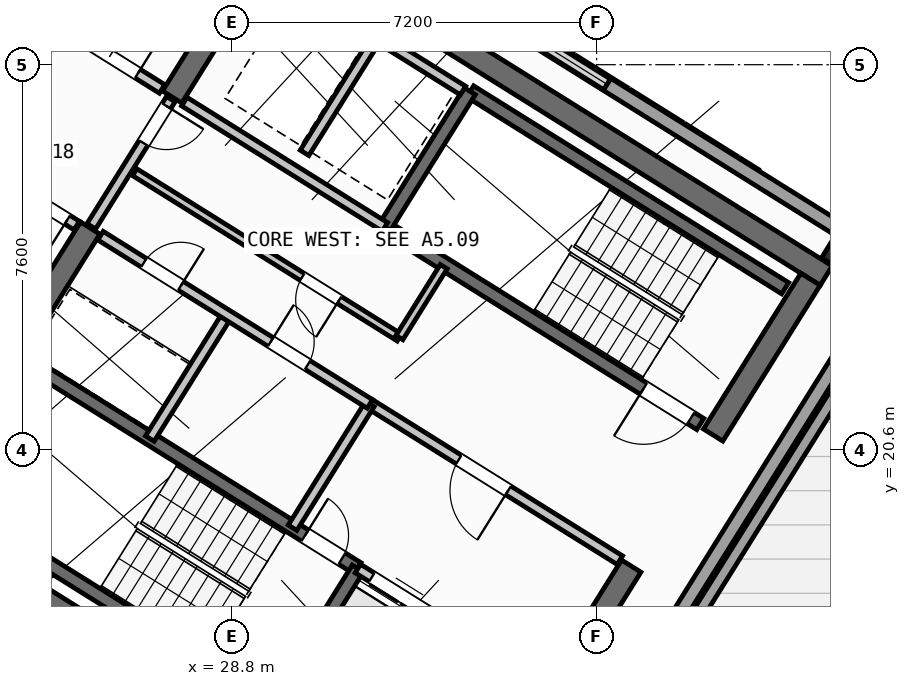
"""IFC4 building model, lengths in metres.
Left out: names, types, materials, properties, quantities, classifications, styles, units other than length and angle.
Written with IfcOpenShell. Run it as: python <this file> out.ifc"""

import sys

from ifc_helpers import new_model, si_unit, direction, frame, frame_2d, origin, origin_2d, place, context, subcontext, project, spatial, rectangle, hollow_rectangle, extrude, source, transform, mapped, element, fill, save


model = new_model("IFC4")
c1 = context("Model", 3, precision=1e-05, world=origin(), true_north=direction((0.0, 1.0)))
c2 = subcontext(c1, "Body", "Model", "MODEL_VIEW")
j1 = project(units=[si_unit("LENGTHUNIT", "METRE"), si_unit("PLANEANGLEUNIT", "RADIAN")], contexts=[c1])
p1 = place(None, origin())
s1 = spatial("IfcSite", under=j1, at=p1, CompositionType="ELEMENT")
p2 = place(p1, origin())
s2 = spatial("IfcBuilding", under=s1, at=p2, CompositionType="ELEMENT")
p3 = place(p2, frame((0.0, 0.0, 298.8)))
s3 = spatial("IfcBuildingStorey", under=s2, at=p3, CompositionType="ELEMENT", Elevation=298.8)
p4 = place(p3, frame((40.531, 24.036, 0.0), z_axis=(0.0, 0.0, 1.0), x_axis=(-0.848048787466, 0.529918157905, 0.0)))
e1 = element("IfcWall", 1, at=p4, inside=s3, PredefinedType="SHEAR", context=c2, shape_type="SweptSolid", body=[
    extrude(rectangle(XDim=13.04, YDim=0.45, at=frame_2d((6.52, 0.0))), origin(), (0.0, 0.0, 1.0), 3.32),
])
p5 = place(p3, frame((33.324, 12.503, 0.0), z_axis=(0.0, 0.0, 1.0), x_axis=(-0.848043529849, 0.529926571782, 0.0)))
e2 = element("IfcWall", 2, at=p5, inside=s3, PredefinedType="SHEAR", context=c2, shape_type="SweptSolid", body=[
    extrude(rectangle(XDim=13.04, YDim=0.45, at=frame_2d((6.52, 0.0))), origin(), (0.0, 0.0, 1.0), 3.32),
])
p6 = place(p3, frame((40.221, 23.965, 0.0), z_axis=(0.0, 0.0, 1.0), x_axis=(-0.529902075036, -0.848058836916, 0.0)))
e3 = element("IfcWall", 3, at=p6, inside=s3, PredefinedType="SHEAR", context=c2, shape_type="SweptSolid", body=[
    extrude(rectangle(XDim=3.625, YDim=0.45, at=frame_2d((1.812, 0.0))), origin(), (0.0, 0.0, 1.0), 3.32),
])
p7 = place(p3, frame((36.683, 18.304, 0.0), z_axis=(0.0, 0.0, 1.0), x_axis=(-0.529904039071, -0.848057609704, 0.0)))
e4 = element("IfcWall", 4, at=p7, inside=s3, PredefinedType="SHEAR", context=c2, shape_type="SweptSolid", body=[
    extrude(rectangle(XDim=6.475, YDim=0.45, at=frame_2d((3.238, 0.0))), origin(), (0.0, 0.0, 1.0), 3.32),
])
p8 = place(p3, frame((29.544, 30.636, 0.0), z_axis=(0.0, 0.0, 1.0), x_axis=(-0.529902075036, -0.848058836916, 0.0)))
e5 = element("IfcWall", 5, at=p8, inside=s3, PredefinedType="SHEAR", context=c2, shape_type="SweptSolid", body=[
    extrude(rectangle(XDim=3.625, YDim=0.45, at=frame_2d((1.812, 0.0))), origin(), (0.0, 0.0, 1.0), 3.32),
])
p9 = place(p3, frame((26.007, 24.976, 0.0), z_axis=(0.0, 0.0, 1.0), x_axis=(-0.529931155655, -0.848040665456, 0.0)))
e6 = element("IfcWall", 6, at=p9, inside=s3, PredefinedType="SHEAR", context=c2, shape_type="SweptSolid", body=[
    extrude(rectangle(XDim=6.475, YDim=0.45, at=frame_2d((3.238, 0.0))), origin(), (0.0, 0.0, 1.0), 3.32),
])
m1 = source(origin(), c2, "Body", "SweptSolid", [
    extrude(hollow_rectangle(XDim=0.5, YDim=0.5, WallThickness=0.025, at=origin_2d()), origin(), (0.0, 0.0, 1.0), 3.6),
])
p10 = place(p3, frame((40.783, 24.469, 0.0), z_axis=(0.0, 0.0, 1.0), x_axis=(-0.848048096156, 0.529919264233, 0.0)))
e7 = element("IfcColumn", 7, at=p10, inside=s3, PredefinedType="COLUMN", context=c2, shape_type="MappedRepresentation", body=[
    mapped(m1, transform((0.0, 0.0, 0.0), scale=1.0)),
])
p11 = place(p3, frame((31.994, 7.742, 0.0), z_axis=(0.0, 0.0, 1.0), x_axis=(0.529920903963, 0.848047071537, 0.0)))
e8 = element("IfcWall", 8, at=p11, inside=s3, PredefinedType="PARAPET", context=c2, shape_type="SweptSolid", body=[
    extrude(rectangle(XDim=17.436, YDim=0.24, at=frame_2d((8.718, 0.0))), origin(), (0.0, 0.0, 1.0), 1.15),
])
p12 = place(p3, frame((41.182, 23.031, 0.0), z_axis=(0.0, 0.0, 1.0), x_axis=(-0.529915150569, -0.848050666645, 0.0)))
e9 = element("IfcWall", 9, at=p12, inside=s3, PredefinedType="STANDARD", context=c2, shape_type="SweptSolid", body=[
    extrude(rectangle(XDim=18.334, YDim=0.28, at=frame_2d((9.167, 0.0))), origin(), (0.0, 0.0, 1.0), 3.32),
])
p13 = place(p12, frame((8.317, 0.0, 0.85)))
e10 = element("IfcOpeningElement", 10, at=p13, cuts=e9, PredefinedType="OPENING", context=c2, shape_type="SweptSolid", body=[
    extrude(rectangle(XDim=1.7, YDim=1.6, at=frame_2d((0.85, 0.8))), frame((0.0, 0.15, 0.0), z_axis=(0.0, -1.0, 0.0), x_axis=(1.0, 0.0, 0.0)), (0.0, 0.0, 1.0), 0.3),
])
p14 = place(p3, frame((29.512, 7.031, 0.0), z_axis=(0.0, 0.0, 1.0), x_axis=(-0.848049620433, 0.529916824873, 0.0)))
e11 = element("IfcWall", 11, at=p14, inside=s3, PredefinedType="STANDARD", context=c2, shape_type="SweptSolid", body=[
    extrude(rectangle(XDim=22.984, YDim=0.28, at=frame_2d((11.492, 0.0))), origin(), (0.0, 0.0, 1.0), 3.32),
])
p15 = place(p14, frame((8.283, 0.0, 0.85)))
e12 = element("IfcOpeningElement", 12, at=p15, cuts=e11, PredefinedType="OPENING", context=c2, shape_type="SweptSolid", body=[
    extrude(rectangle(XDim=1.7, YDim=1.6, at=frame_2d((0.85, 0.8))), frame((0.0, 0.15, 0.0), z_axis=(0.0, -1.0, 0.0), x_axis=(1.0, 0.0, 0.0)), (0.0, 0.0, 1.0), 0.3),
])
p16 = place(p14, frame((19.875, 0.0, 0.85)))
e13 = element("IfcOpeningElement", 13, at=p16, cuts=e11, PredefinedType="OPENING", context=c2, shape_type="SweptSolid", body=[
    extrude(rectangle(XDim=1.7, YDim=1.6, at=frame_2d((0.85, 0.8))), frame((0.0, 0.15, 0.0), z_axis=(0.0, -1.0, 0.0), x_axis=(1.0, 0.0, 0.0)), (0.0, 0.0, 1.0), 0.3),
])
p17 = place(p3, frame((21.239, 37.164, 0.0), z_axis=(0.0, 0.0, 1.0), x_axis=(0.848046637573, -0.529921598447, 0.0)))
e14 = element("IfcWall", 14, at=p17, inside=s3, PredefinedType="STANDARD", context=c2, shape_type="SweptSolid", body=[
    extrude(rectangle(XDim=22.984, YDim=0.28, at=frame_2d((11.492, 0.0))), origin(), (0.0, 0.0, 1.0), 3.32),
])
p18 = place(p17, frame((4.326, 0.0, 0.85)))
e15 = element("IfcOpeningElement", 15, at=p18, cuts=e14, PredefinedType="OPENING", context=c2, shape_type="SweptSolid", body=[
    extrude(rectangle(XDim=1.7, YDim=1.6, at=frame_2d((0.85, 0.8))), frame((0.0, 0.15, 0.0), z_axis=(0.0, -1.0, 0.0), x_axis=(1.0, 0.0, 0.0)), (0.0, 0.0, 1.0), 0.3),
])
p19 = place(p17, frame((15.968, 0.0, 0.85)))
e16 = element("IfcOpeningElement", 16, at=p19, cuts=e14, PredefinedType="OPENING", context=c2, shape_type="SweptSolid", body=[
    extrude(rectangle(XDim=1.7, YDim=1.6, at=frame_2d((0.85, 0.8))), frame((0.0, 0.15, 0.0), z_axis=(0.0, -1.0, 0.0), x_axis=(1.0, 0.0, 0.0)), (0.0, 0.0, 1.0), 0.3),
])
p20 = place(p3, frame((29.605, 15.581, 0.0), z_axis=(0.0, 0.0, 1.0), x_axis=(-0.848036911448, 0.529937163087, 0.0)))
e17 = element("IfcWall", 17, at=p20, inside=s3, PredefinedType="SHEAR", context=c2, shape_type="SweptSolid", body=[
    extrude(rectangle(XDim=7.46, YDim=0.26, at=frame_2d((3.73, 0.0))), origin(), (0.0, 0.0, 1.0), 3.32),
])
p21 = place(p3, frame((31.28, 18.261, 0.0), z_axis=(0.0, 0.0, 1.0), x_axis=(-0.848051618787, 0.529913626805, 0.0)))
e18 = element("IfcWall", 18, at=p21, inside=s3, PredefinedType="SHEAR", context=c2, shape_type="SweptSolid", body=[
    extrude(rectangle(XDim=7.46, YDim=0.26, at=frame_2d((3.73, 0.0))), origin(), (0.0, 0.0, 1.0), 3.32),
])
p22 = place(p21, frame((0.36, 0.0, 0.0)))
e19 = element("IfcOpeningElement", 19, at=p22, cuts=e18, PredefinedType="OPENING", context=c2, shape_type="SweptSolid", body=[
    extrude(rectangle(XDim=0.86, YDim=2.05, at=frame_2d((0.43, 1.025))), frame((0.0, 0.14, 0.0), z_axis=(0.0, -1.0, 0.0), x_axis=(1.0, 0.0, 0.0)), (0.0, 0.0, 1.0), 0.28),
])
p23 = place(p3, frame((31.288, 18.256, 0.0), z_axis=(0.0, 0.0, 1.0), x_axis=(-0.529943379326, -0.848033026897, 0.0)))
e20 = element("IfcWall", 20, at=p23, inside=s3, PredefinedType="SHEAR", context=c2, shape_type="SweptSolid", body=[
    extrude(rectangle(XDim=3.16, YDim=0.26, at=frame_2d((1.58, 0.0))), origin(), (0.0, 0.0, 1.0), 3.32),
])
p24 = place(p3, frame((39.721, 23.788, 0.0), z_axis=(0.0, 0.0, 1.0), x_axis=(-0.848054434086, 0.529909121291, 0.0)))
e21 = element("IfcWall", 21, at=p24, inside=s3, PredefinedType="SHEAR", context=c2, shape_type="SweptSolid", body=[
    extrude(rectangle(XDim=7.33, YDim=0.26, at=frame_2d((3.665, 0.0))), origin(), (0.0, 0.0, 1.0), 3.32),
])
p25 = place(p3, frame((38.046, 21.108, 0.0), z_axis=(0.0, 0.0, 1.0), x_axis=(-0.848054434086, 0.529909121291, 0.0)))
e22 = element("IfcWall", 22, at=p25, inside=s3, PredefinedType="SHEAR", context=c2, shape_type="SweptSolid", body=[
    extrude(rectangle(XDim=7.33, YDim=0.26, at=frame_2d((3.665, 0.0))), origin(), (0.0, 0.0, 1.0), 3.32),
])
p26 = place(p25, frame((0.22, 0.0, 0.0)))
e23 = element("IfcOpeningElement", 23, at=p26, cuts=e22, PredefinedType="OPENING", context=c2, shape_type="SweptSolid", body=[
    extrude(rectangle(XDim=1.1, YDim=2.1, at=frame_2d((0.55, 1.05))), frame((0.0, 0.14, 0.0), z_axis=(0.0, -1.0, 0.0), x_axis=(1.0, 0.0, 0.0)), (0.0, 0.0, 1.0), 0.28),
])
p27 = place(p3, frame((33.496, 27.677, 0.0), z_axis=(0.0, 0.0, 1.0), x_axis=(-0.529908658664, -0.84805472316, 0.0)))
e24 = element("IfcWall", 24, at=p27, inside=s3, PredefinedType="SHEAR", context=c2, shape_type="SweptSolid", body=[
    extrude(rectangle(XDim=3.16, YDim=0.26, at=frame_2d((1.58, 0.0))), origin(), (0.0, 0.0, 1.0), 3.32),
])
p28 = place(p3, frame((34.933, 15.978, 0.0), z_axis=(0.0, 0.0, 1.0), x_axis=(-0.848055739377, 0.529907032327, 0.0)))
e25 = element("IfcWall", 25, at=p28, inside=s3, PredefinedType="STANDARD", context=c2, shape_type="SweptSolid", body=[
    extrude(rectangle(XDim=4.298, YDim=0.2, at=frame_2d((2.149, 0.0))), origin(), (0.0, 0.0, 1.0), 3.31),
])
p29 = place(p28, frame((0.448, 0.0, 0.0)))
e26 = element("IfcOpeningElement", 26, at=p29, cuts=e25, PredefinedType="OPENING", context=c2, shape_type="SweptSolid", body=[
    extrude(rectangle(XDim=1.3, YDim=2.2, at=frame_2d((0.65, 1.1))), frame((0.0, 0.11, 0.0), z_axis=(0.0, -1.0, 0.0), x_axis=(1.0, 0.0, 0.0)), (0.0, 0.0, 1.0), 0.22),
])
p30 = place(p28, frame((2.523, 0.0, 0.0)))
e27 = element("IfcOpeningElement", 27, at=p30, cuts=e25, PredefinedType="OPENING", context=c2, shape_type="SweptSolid", body=[
    extrude(rectangle(XDim=1.45, YDim=2.25, at=frame_2d((0.725, 1.125))), frame((0.0, 0.11, 0.0), z_axis=(0.0, -1.0, 0.0), x_axis=(1.0, 0.0, 0.0)), (0.0, 0.0, 1.0), 0.22),
])
p31 = place(p3, frame((36.459, 18.421, 0.0), z_axis=(0.0, 0.0, 1.0), x_axis=(-0.848059591691, 0.529900867089, 0.0)))
e28 = element("IfcWall", 28, at=p31, inside=s3, PredefinedType="STANDARD", context=c2, shape_type="SweptSolid", body=[
    extrude(rectangle(XDim=5.818, YDim=0.2, at=frame_2d((2.909, 0.0))), origin(), (0.0, 0.0, 1.0), 3.31),
])
p32 = place(p31, frame((2.598, 0.0, 0.0)))
e29 = element("IfcOpeningElement", 29, at=p32, cuts=e28, PredefinedType="OPENING", context=c2, shape_type="SweptSolid", body=[
    extrude(rectangle(XDim=1.15, YDim=2.1, at=frame_2d((0.575, 1.05))), frame((0.0, 0.11, 0.0), z_axis=(0.0, -1.0, 0.0), x_axis=(1.0, 0.0, 0.0)), (0.0, 0.0, 1.0), 0.22),
])
p33 = place(p3, frame((31.822, 24.998, 0.0), z_axis=(0.0, 0.0, 1.0), x_axis=(-0.848054125777, 0.529909614701, 0.0)))
e30 = element("IfcWall", 30, at=p33, inside=s3, PredefinedType="STANDARD", context=c2, shape_type="SweptSolid", body=[
    extrude(rectangle(XDim=4.668, YDim=0.2, at=frame_2d((2.334, 0.0))), origin(), (0.0, 0.0, 1.0), 3.31),
])
p34 = place(p3, frame((32.108, 22.814, 0.0), z_axis=(0.0, 0.0, 1.0), x_axis=(-0.848047283855, 0.529920564185, 0.0)))
e31 = element("IfcWall", 31, at=p34, inside=s3, PredefinedType="PARTITIONING", context=c2, shape_type="SweptSolid", body=[
    extrude(rectangle(XDim=6.16, YDim=0.16, at=frame_2d((3.08, 0.0))), origin(), (0.0, 0.0, 1.0), 3.31),
])
p35 = place(p34, frame((1.4, 0.0, 0.0)))
e32 = element("IfcOpeningElement", 32, at=p35, cuts=e31, PredefinedType="OPENING", context=c2, shape_type="SweptSolid", body=[
    extrude(rectangle(XDim=0.86, YDim=2.05, at=frame_2d((0.43, 1.025))), frame((0.0, 0.09, 0.0), z_axis=(0.0, -1.0, 0.0), x_axis=(1.0, 0.0, 0.0)), (0.0, 0.0, 1.0), 0.18),
])
p36 = place(p3, frame((32.982, 24.213, 0.0), z_axis=(0.0, 0.0, 1.0), x_axis=(-0.529839334948, -0.84809803628, 0.0)))
e33 = element("IfcWall", 33, at=p36, inside=s3, PredefinedType="PARTITIONING", context=c2, shape_type="SweptSolid", body=[
    extrude(rectangle(XDim=1.65, YDim=0.16, at=frame_2d((0.825, 0.0))), origin(), (0.0, 0.0, 1.0), 3.31),
])
p37 = place(p3, frame((31.645, 28.716, 0.0), z_axis=(0.0, 0.0, 1.0), x_axis=(-0.52986693015, -0.848080795876, 0.0)))
e34 = element("IfcWall", 34, at=p37, inside=s3, PredefinedType="STANDARD", context=c2, shape_type="SweptSolid", body=[
    extrude(rectangle(XDim=2.66, YDim=0.2, at=frame_2d((1.33, 0.0))), origin(), (0.0, 0.0, 1.0), 3.31),
])
p38 = place(p3, frame((33.363, 27.69, 0.0), z_axis=(0.0, 0.0, 1.0), x_axis=(-0.84804957148, 0.529916903215, 0.0)))
e35 = element("IfcWall", 35, at=p38, inside=s3, PredefinedType="STANDARD", context=c2, shape_type="SweptSolid", body=[
    extrude(rectangle(XDim=4.548, YDim=0.2, at=frame_2d((2.274, 0.0))), origin(), (0.0, 0.0, 1.0), 3.31),
])
for number, where, z_axis, x_axis in (
    (36, (31.525, 21.504, 0.0), (0.0, 0.0, 1.0), (-0.53, -0.848, 0.0)),
    (37, (28.71, 23.263, 0.0), (0.0, 0.0, 1.0), (-0.53, -0.848, 0.0)),
):
    element("IfcWall", number, at=place(p3, frame(where, z_axis=z_axis, x_axis=x_axis)), inside=s3, PredefinedType="STANDARD", context=c2, shape_type="SweptSolid", body=[
        extrude(rectangle(XDim=2.88, YDim=0.2, at=frame_2d((1.44, 0.0))), origin(), (0.0, 0.0, 1.0), 3.31),
    ])
p39 = place(p3, frame((31.525, 21.504, 0.0), z_axis=(0.0, 0.0, 1.0), x_axis=(-0.848042066329, 0.529928913853, 0.0)))
e38 = element("IfcWall", 38, at=p39, inside=s3, PredefinedType="STANDARD", context=c2, shape_type="SweptSolid", body=[
    extrude(rectangle(XDim=6.268, YDim=0.2, at=frame_2d((3.134, 0.0))), origin(), (0.0, 0.0, 1.0), 3.31),
])
p40 = place(p39, frame((4.4, 0.0, 0.0)))
e39 = element("IfcOpeningElement", 39, at=p40, cuts=e38, PredefinedType="OPENING", context=c2, shape_type="SweptSolid", body=[
    extrude(rectangle(XDim=0.86, YDim=2.05, at=frame_2d((0.43, 1.025))), frame((0.0, 0.11, 0.0), z_axis=(0.0, -1.0, 0.0), x_axis=(1.0, 0.0, 0.0)), (0.0, 0.0, 1.0), 0.22),
])
p41 = place(p39, frame((1.45, 0.0, 0.0)))
e40 = element("IfcOpeningElement", 40, at=p41, cuts=e38, PredefinedType="OPENING", context=c2, shape_type="SweptSolid", body=[
    extrude(rectangle(XDim=0.86, YDim=2.05, at=frame_2d((0.43, 1.025))), frame((0.0, 0.11, 0.0), z_axis=(0.0, -1.0, 0.0), x_axis=(1.0, 0.0, 0.0)), (0.0, 0.0, 1.0), 0.22),
])
p42 = place(p3, frame((27.596, 27.52, 0.0), z_axis=(0.0, 0.0, 1.0), x_axis=(-0.529865479138, -0.848081702443, 0.0)))
e41 = element("IfcWall", 41, at=p42, inside=s3, PredefinedType="STANDARD", context=c2, shape_type="SweptSolid", body=[
    extrude(rectangle(XDim=2.96, YDim=0.2, at=frame_2d((1.48, 0.0))), origin(), (0.0, 0.0, 1.0), 3.31),
])
p43 = place(p42, frame((0.16, 0.0, 0.0)))
e42 = element("IfcOpeningElement", 42, at=p43, cuts=e41, PredefinedType="OPENING", context=c2, shape_type="SweptSolid", body=[
    extrude(rectangle(XDim=0.86, YDim=2.05, at=frame_2d((0.43, 1.025))), frame((0.0, 0.11, 0.0), z_axis=(0.0, -1.0, 0.0), x_axis=(1.0, 0.0, 0.0)), (0.0, 0.0, 1.0), 0.22),
])
p44 = place(p3, frame((25.74, 25.025, 0.0), z_axis=(0.0, 0.0, 1.0), x_axis=(-0.848049978884, 0.529916251227, 0.0)))
e43 = element("IfcWall", 43, at=p44, inside=s3, PredefinedType="STANDARD", context=c2, shape_type="SweptSolid", body=[
    extrude(rectangle(XDim=11.678, YDim=0.2, at=frame_2d((5.839, 0.0))), origin(), (0.0, 0.0, 1.0), 3.31),
])
p45 = place(p44, frame((0.218, 0.0, 0.0)))
e44 = element("IfcOpeningElement", 44, at=p45, cuts=e43, PredefinedType="OPENING", context=c2, shape_type="SweptSolid", body=[
    extrude(rectangle(XDim=1.3, YDim=2.15, at=frame_2d((0.65, 1.075))), frame((0.0, 0.11, 0.0), z_axis=(0.0, -1.0, 0.0), x_axis=(1.0, 0.0, 0.0)), (0.0, 0.0, 1.0), 0.22),
])
p46 = place(p44, frame((6.003, 0.0, 0.0)))
e45 = element("IfcOpeningElement", 45, at=p46, cuts=e43, PredefinedType="OPENING", context=c2, shape_type="SweptSolid", body=[
    extrude(rectangle(XDim=1.3, YDim=2.15, at=frame_2d((0.65, 1.075))), frame((0.0, 0.11, 0.0), z_axis=(0.0, -1.0, 0.0), x_axis=(1.0, 0.0, 0.0)), (0.0, 0.0, 1.0), 0.22),
])
p47 = place(p3, frame((27.425, 27.721, 0.0), z_axis=(0.0, 0.0, 1.0), x_axis=(-0.848055849499, 0.529906856089, 0.0)))
e46 = element("IfcWall", 46, at=p47, inside=s3, PredefinedType="STANDARD", context=c2, shape_type="SweptSolid", body=[
    extrude(rectangle(XDim=11.678, YDim=0.2, at=frame_2d((5.839, 0.0))), origin(), (0.0, 0.0, 1.0), 3.31),
])
p48 = place(p47, frame((0.568, 0.0, 0.0)))
e47 = element("IfcOpeningElement", 47, at=p48, cuts=e46, PredefinedType="OPENING", context=c2, shape_type="SweptSolid", body=[
    extrude(rectangle(XDim=1.3, YDim=2.15, at=frame_2d((0.65, 1.075))), frame((0.0, 0.11, 0.0), z_axis=(0.0, -1.0, 0.0), x_axis=(1.0, 0.0, 0.0)), (0.0, 0.0, 1.0), 0.22),
])
m2 = source(origin(), c2, "Body", "SweptSolid", [
    extrude(rectangle(XDim=1.7, YDim=1.6, at=frame_2d((0.85, 0.8))), frame((0.0, 0.03, 0.0), z_axis=(0.0, -1.0, 0.0), x_axis=(1.0, 0.0, 0.0)), (0.0, 0.0, 1.0), 0.06),
])
p49 = place(p19, origin())
e48 = element("IfcWindow", 48, at=p49, inside=s3, PartitioningType="SINGLE_PANEL", PredefinedType="WINDOW", context=c2, shape_type="MappedRepresentation", body=[
    mapped(m2, transform((0.0, 0.0, 0.0), scale=1.0)),
])
fill(e16, e48)
m3 = source(origin(), c2, "Body", "SweptSolid", [
    extrude(rectangle(XDim=0.86, YDim=2.05, at=frame_2d((0.43, 1.025))), frame((0.0, 0.025, 0.0), z_axis=(0.0, -1.0, 0.0), x_axis=(1.0, 0.0, 0.0)), (0.0, 0.0, 1.0), 0.05),
])
p50 = place(p22, frame((0.86, 0.0, 0.0), z_axis=(0.0, 0.0, 1.0), x_axis=(-1.0, 0.0, 0.0)))
e49 = element("IfcDoor", 49, at=p50, inside=s3, OperationType="SINGLE_SWING_LEFT", PredefinedType="DOOR", context=c2, shape_type="MappedRepresentation", body=[
    mapped(m3, transform((0.0, 0.0, 0.0), scale=1.0)),
])
fill(e19, e49)
p51 = place(p35, origin())
e50 = element("IfcDoor", 50, at=p51, inside=s3, OperationType="SINGLE_SWING_LEFT", PredefinedType="DOOR", context=c2, shape_type="MappedRepresentation", body=[
    mapped(m3, transform((0.0, 0.0, 0.0), scale=1.0)),
])
fill(e32, e50)
m4 = source(origin(), c2, "Body", "SweptSolid", [
    extrude(rectangle(XDim=1.1, YDim=2.1, at=frame_2d((0.55, 1.05))), frame((0.0, 0.025, 0.0), z_axis=(0.0, -1.0, 0.0), x_axis=(1.0, 0.0, 0.0)), (0.0, 0.0, 1.0), 0.05),
])
p52 = place(p26, origin())
e51 = element("IfcDoor", 51, at=p52, inside=s3, OperationType="SINGLE_SWING_RIGHT", PredefinedType="DOOR", context=c2, shape_type="MappedRepresentation", body=[
    mapped(m4, transform((0.0, 0.0, 0.0), scale=1.0)),
])
fill(e23, e51)
m5 = source(origin(), c2, "Body", "SweptSolid", [
    extrude(rectangle(XDim=1.15, YDim=2.1, at=frame_2d((0.575, 1.05))), frame((0.0, 0.025, 0.0), z_axis=(0.0, -1.0, 0.0), x_axis=(1.0, 0.0, 0.0)), (0.0, 0.0, 1.0), 0.05),
])
p53 = place(p32, origin())
e52 = element("IfcDoor", 52, at=p53, inside=s3, OperationType="SINGLE_SWING_LEFT", PredefinedType="DOOR", context=c2, shape_type="MappedRepresentation", body=[
    mapped(m5, transform((0.0, 0.0, 0.0), scale=1.0)),
])
fill(e29, e52)
m6 = source(origin(), c2, "Body", "SweptSolid", [
    extrude(rectangle(XDim=1.45, YDim=2.25, at=frame_2d((0.725, 1.125))), frame((0.0, 0.025, 0.0), z_axis=(0.0, -1.0, 0.0), x_axis=(1.0, 0.0, 0.0)), (0.0, 0.0, 1.0), 0.05),
])
p54 = place(p30, origin())
e53 = element("IfcDoor", 53, at=p54, inside=s3, OperationType="DOUBLE_DOOR_SLIDING", PredefinedType="DOOR", context=c2, shape_type="MappedRepresentation", body=[
    mapped(m6, transform((0.0, 0.0, 0.0), scale=1.0)),
])
fill(e27, e53)
p55 = place(p40, frame((0.86, 0.0, 0.0), z_axis=(0.0, 0.0, 1.0), x_axis=(-1.0, 0.0, 0.0)))
e54 = element("IfcDoor", 54, at=p55, inside=s3, OperationType="SINGLE_SWING_RIGHT", PredefinedType="DOOR", context=c2, shape_type="MappedRepresentation", body=[
    mapped(m3, transform((0.0, 0.0, 0.0), scale=1.0)),
])
fill(e39, e54)
p56 = place(p41, frame((0.86, 0.0, 0.0), z_axis=(0.0, 0.0, 1.0), x_axis=(-1.0, 0.0, 0.0)))
e55 = element("IfcDoor", 55, at=p56, inside=s3, OperationType="SINGLE_SWING_LEFT", PredefinedType="DOOR", context=c2, shape_type="MappedRepresentation", body=[
    mapped(m3, transform((0.0, 0.0, 0.0), scale=1.0)),
])
fill(e40, e55)
p57 = place(p43, origin())
e56 = element("IfcDoor", 56, at=p57, inside=s3, OperationType="SINGLE_SWING_LEFT", PredefinedType="DOOR", context=c2, shape_type="MappedRepresentation", body=[
    mapped(m3, transform((0.0, 0.0, 0.0), scale=1.0)),
])
fill(e42, e56)
m7 = source(origin(), c2, "Body", "SweptSolid", [
    extrude(rectangle(XDim=1.3, YDim=2.15, at=frame_2d((0.65, 1.075))), frame((0.0, 0.025, 0.0), z_axis=(0.0, -1.0, 0.0), x_axis=(1.0, 0.0, 0.0)), (0.0, 0.0, 1.0), 0.05),
])
p58 = place(p45, origin())
e57 = element("IfcDoor", 57, at=p58, inside=s3, OperationType="DOUBLE_DOOR_SINGLE_SWING", PredefinedType="DOOR", context=c2, shape_type="MappedRepresentation", body=[
    mapped(m7, transform((0.0, 0.0, 0.0), scale=1.0)),
])
fill(e44, e57)
p59 = place(p48, frame((1.3, 0.0, 0.0), z_axis=(0.0, 0.0, 1.0), x_axis=(-1.0, 0.0, 0.0)))
e58 = element("IfcDoor", 58, at=p59, inside=s3, OperationType="DOUBLE_DOOR_SINGLE_SWING", PredefinedType="DOOR", context=c2, shape_type="MappedRepresentation", body=[
    mapped(m7, transform((0.0, 0.0, 0.0), scale=1.0)),
])
fill(e47, e58)
save(model, sys.argv[1])
